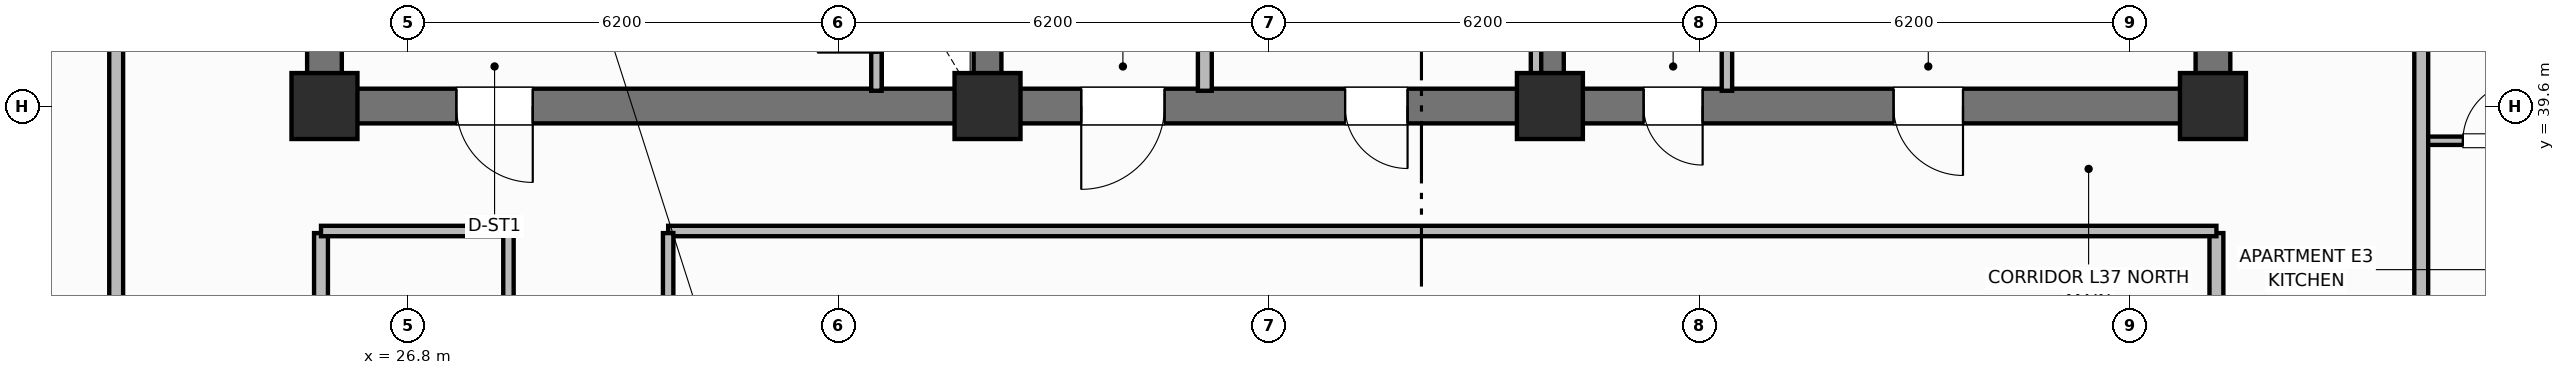
"""IFC4 building model, lengths in metres.
Left out: names, types, materials, properties, quantities, classifications, styles, units other than length and angle.
Written with IfcOpenShell. Run it as: python <this file> out.ifc"""

import sys

from ifc_helpers import new_model, si_unit, direction, frame, frame_2d, origin, origin_2d, place, context, subcontext, project, spatial, rectangle, extrude, element, fill, save


model = new_model("IFC4")
c1 = context("Model", 3, precision=1e-05, world=origin(), true_north=direction((0.0, 1.0)))
c2 = subcontext(c1, "Body", "Model", "MODEL_VIEW")
j1 = project(units=[si_unit("LENGTHUNIT", "METRE"), si_unit("PLANEANGLEUNIT", "RADIAN")], contexts=[c1])
p1 = place(None, origin())
s1 = spatial("IfcSite", under=j1, at=p1, CompositionType="ELEMENT")
p2 = place(p1, origin())
s2 = spatial("IfcBuilding", under=s1, at=p2, CompositionType="ELEMENT")
p3 = place(p2, frame((0.0, 0.0, 151.5)))
s3 = spatial("IfcBuildingStorey", under=s2, at=p3, CompositionType="ELEMENT", Elevation=151.5)
for number, where, z_axis, x_axis in (
    (1, (25.6, 39.85, 0.0), (0.0, 0.0, 1.0), (0.0, 1.0, 0.0)),
    (2, (52.8, 39.85, 0.0), (0.0, 0.0, 1.0), (0.0, 1.0, 0.0)),
):
    element("IfcWall", number, at=place(p3, frame(where, z_axis=z_axis, x_axis=x_axis)), inside=s3, PredefinedType="SHEAR", context=c2, shape_type="SweptSolid", body=[
        extrude(rectangle(XDim=5.7, YDim=0.5, at=frame_2d((2.85, 0.0))), origin(), (0.0, 0.0, 1.0), 3.7),
    ])
p4 = place(p3, frame((52.8, 39.6, 0.0), z_axis=(0.0, 0.0, 1.0), x_axis=(-1.0, 0.0, 0.0)))
e3 = element("IfcWall", 3, at=p4, inside=s3, PredefinedType="SHEAR", context=c2, shape_type="SweptSolid", body=[
    extrude(rectangle(XDim=27.2, YDim=0.5, at=frame_2d((13.6, 0.0))), origin(), (0.0, 0.0, 1.0), 3.7),
])
p5 = place(p4, frame((24.2, 0.0, 0.0)))
e4 = element("IfcOpeningElement", 4, at=p5, cuts=e3, PredefinedType="OPENING", context=c2, shape_type="SweptSolid", body=[
    extrude(rectangle(XDim=1.1, YDim=2.15, at=frame_2d((0.55, 1.075))), frame((0.0, 0.26, 0.0), z_axis=(0.0, -1.0, 0.0), x_axis=(1.0, 0.0, 0.0)), (0.0, 0.0, 1.0), 0.52),
])
p6 = place(p4, frame((15.1, 0.0, 0.0)))
e5 = element("IfcOpeningElement", 5, at=p6, cuts=e3, PredefinedType="OPENING", context=c2, shape_type="SweptSolid", body=[
    extrude(rectangle(XDim=1.2, YDim=2.15, at=frame_2d((0.6, 1.075))), frame((0.0, 0.26, 0.0), z_axis=(0.0, -1.0, 0.0), x_axis=(1.0, 0.0, 0.0)), (0.0, 0.0, 1.0), 0.52),
])
p7 = place(p4, frame((11.6, 0.0, 0.0)))
e6 = element("IfcOpeningElement", 6, at=p7, cuts=e3, PredefinedType="OPENING", context=c2, shape_type="SweptSolid", body=[
    extrude(rectangle(XDim=0.9, YDim=2.1, at=frame_2d((0.45, 1.05))), frame((0.0, 0.26, 0.0), z_axis=(0.0, -1.0, 0.0), x_axis=(1.0, 0.0, 0.0)), (0.0, 0.0, 1.0), 0.52),
])
p8 = place(p4, frame((7.35, 0.0, 0.0)))
e7 = element("IfcOpeningElement", 7, at=p8, cuts=e3, PredefinedType="OPENING", context=c2, shape_type="SweptSolid", body=[
    extrude(rectangle(XDim=0.85, YDim=2.1, at=frame_2d((0.425, 1.05))), frame((0.0, 0.26, 0.0), z_axis=(0.0, -1.0, 0.0), x_axis=(1.0, 0.0, 0.0)), (0.0, 0.0, 1.0), 0.52),
])
p9 = place(p4, frame((3.6, 0.0, 0.0)))
e8 = element("IfcOpeningElement", 8, at=p9, cuts=e3, PredefinedType="OPENING", context=c2, shape_type="SweptSolid", body=[
    extrude(rectangle(XDim=1.0, YDim=2.15, at=frame_2d((0.5, 1.075))), frame((0.0, 0.26, 0.0), z_axis=(0.0, -1.0, 0.0), x_axis=(1.0, 0.0, 0.0)), (0.0, 0.0, 1.0), 0.52),
])
for number, where, z_axis, x_axis in (
    (9, (35.15, 39.85, 0.0), (0.0, 0.0, 1.0), (0.0, 1.0, 0.0)),
    (10, (43.25, 39.85, 0.0), (0.0, 0.0, 1.0), (0.0, 1.0, 0.0)),
):
    element("IfcWall", number, at=place(p3, frame(where, z_axis=z_axis, x_axis=x_axis)), inside=s3, PredefinedType="SHEAR", context=c2, shape_type="SweptSolid", body=[
        extrude(rectangle(XDim=5.7, YDim=0.4, at=frame_2d((2.85, 0.0))), origin(), (0.0, 0.0, 1.0), 3.7),
    ])
for number, where, z_axis, x_axis in (
    (11, (25.6, 39.6, 0.0), (0.0, 0.0, 1.0), (1.0, 0.0, 0.0)),
    (12, (35.15, 39.6, 0.0), (0.0, 0.0, 1.0), (1.0, 0.0, 0.0)),
    (13, (43.25, 39.6, 0.0), (0.0, 0.0, 1.0), (1.0, 0.0, 0.0)),
    (14, (52.8, 39.6, 0.0), (0.0, 0.0, 1.0), (1.0, 0.0, 0.0)),
):
    element("IfcColumn", number, at=place(p3, frame(where, z_axis=z_axis, x_axis=x_axis)), inside=s3, PredefinedType="COLUMN", context=c2, shape_type="SweptSolid", body=[
        extrude(rectangle(XDim=0.95, YDim=0.95, at=origin_2d()), origin(), (0.0, 0.0, 1.0), 3.7),
    ])
p10 = place(p3, frame((33.55, 39.82, 0.0), z_axis=(0.0, 0.0, 1.0), x_axis=(0.0, 1.0, 0.0)))
e15 = element("IfcWall", 15, at=p10, inside=s3, PredefinedType="PARTITIONING", context=c2, shape_type="SweptSolid", body=[
    extrude(rectangle(XDim=2.13, YDim=0.15, at=frame_2d((1.065, 0.0))), origin(), (0.0, 0.0, 1.0), 2.55),
])
p11 = place(p10, frame((0.55, 0.0, 0.0)))
e16 = element("IfcOpeningElement", 16, at=p11, cuts=e15, PredefinedType="OPENING", context=c2, shape_type="SweptSolid", body=[
    extrude(rectangle(XDim=0.85, YDim=2.05, at=frame_2d((0.425, 1.025))), frame((0.0, 0.085, 0.0), z_axis=(0.0, -1.0, 0.0), x_axis=(1.0, 0.0, 0.0)), (0.0, 0.0, 1.0), 0.17),
])
p12 = place(p3, frame((38.28, 39.82, 0.0), z_axis=(0.0, 0.0, 1.0), x_axis=(0.0, 1.0, 0.0)))
e17 = element("IfcWall", 17, at=p12, inside=s3, PredefinedType="PARTITIONING", context=c2, shape_type="SweptSolid", body=[
    extrude(rectangle(XDim=5.63, YDim=0.2, at=frame_2d((2.815, 0.0))), origin(), (0.0, 0.0, 1.0), 2.55),
])
for number, where, z_axis, x_axis in (
    (18, (43.05, 39.82, 0.0), (0.0, 0.0, 1.0), (0.0, 1.0, 0.0)),
    (19, (45.8, 39.82, 0.0), (0.0, 0.0, 1.0), (0.0, 1.0, 0.0)),
):
    element("IfcWall", number, at=place(p3, frame(where, z_axis=z_axis, x_axis=x_axis)), inside=s3, PredefinedType="PARTITIONING", context=c2, shape_type="SweptSolid", body=[
        extrude(rectangle(XDim=5.63, YDim=0.15, at=frame_2d((2.815, 0.0))), origin(), (0.0, 0.0, 1.0), 2.55),
    ])
for number, where, z_axis, x_axis in (
    (20, (25.55, 18.63, 0.0), (0.0, 0.0, 1.0), (0.0, 1.0, 0.0)),
    (21, (52.85, 18.63, 0.0), (0.0, 0.0, 1.0), (0.0, 1.0, 0.0)),
):
    element("IfcWall", number, at=place(p3, frame(where, z_axis=z_axis, x_axis=x_axis)), inside=s3, PredefinedType="PARTITIONING", context=c2, shape_type="SweptSolid", body=[
        extrude(rectangle(XDim=19.14, YDim=0.2, at=frame_2d((9.57, 0.0))), origin(), (0.0, 0.0, 1.0), 2.55),
    ])
p13 = place(p3, frame((25.55, 37.8, 0.0), z_axis=(0.0, 0.0, 1.0), x_axis=(1.0, 0.0, 0.0)))
e22 = element("IfcWall", 22, at=p13, inside=s3, PredefinedType="PARTITIONING", context=c2, shape_type="SweptSolid", body=[
    extrude(rectangle(XDim=2.7, YDim=0.15, at=frame_2d((1.35, 0.0))), origin(), (0.0, 0.0, 1.0), 2.55),
])
p14 = place(p3, frame((30.55, 37.8, 0.0), z_axis=(0.0, 0.0, 1.0), x_axis=(1.0, 0.0, 0.0)))
e23 = element("IfcWall", 23, at=p14, inside=s3, PredefinedType="PARTITIONING", context=c2, shape_type="SweptSolid", body=[
    extrude(rectangle(XDim=22.3, YDim=0.15, at=frame_2d((11.15, 0.0))), origin(), (0.0, 0.0, 1.0), 2.55),
])
p15 = place(p3, frame((28.25, 18.63, 0.0), z_axis=(0.0, 0.0, 1.0), x_axis=(0.0, 1.0, 0.0)))
e24 = element("IfcWall", 24, at=p15, inside=s3, PredefinedType="PARTITIONING", context=c2, shape_type="SweptSolid", body=[
    extrude(rectangle(XDim=19.14, YDim=0.15, at=frame_2d((9.57, 0.0))), origin(), (0.0, 0.0, 1.0), 2.55),
])
p16 = place(p15, frame((3.0, 0.0, 0.0)))
e25 = element("IfcOpeningElement", 25, at=p16, cuts=e24, PredefinedType="OPENING", context=c2, shape_type="SweptSolid", body=[
    extrude(rectangle(XDim=0.9, YDim=2.1, at=frame_2d((0.45, 1.05))), frame((0.0, 0.085, 0.0), z_axis=(0.0, -1.0, 0.0), x_axis=(1.0, 0.0, 0.0)), (0.0, 0.0, 1.0), 0.17),
])
p17 = place(p15, frame((11.5, 0.0, 0.0)))
e26 = element("IfcOpeningElement", 26, at=p17, cuts=e24, PredefinedType="OPENING", context=c2, shape_type="SweptSolid", body=[
    extrude(rectangle(XDim=0.9, YDim=2.1, at=frame_2d((0.45, 1.05))), frame((0.0, 0.085, 0.0), z_axis=(0.0, -1.0, 0.0), x_axis=(1.0, 0.0, 0.0)), (0.0, 0.0, 1.0), 0.17),
])
p18 = place(p3, frame((30.55, 18.63, 0.0), z_axis=(0.0, 0.0, 1.0), x_axis=(0.0, 1.0, 0.0)))
e27 = element("IfcWall", 27, at=p18, inside=s3, PredefinedType="PARTITIONING", context=c2, shape_type="SweptSolid", body=[
    extrude(rectangle(XDim=19.14, YDim=0.15, at=frame_2d((9.57, 0.0))), origin(), (0.0, 0.0, 1.0), 2.55),
])
p19 = place(p18, frame((2.4, 0.0, 0.0)))
e28 = element("IfcOpeningElement", 28, at=p19, cuts=e27, PredefinedType="OPENING", context=c2, shape_type="SweptSolid", body=[
    extrude(rectangle(XDim=1.0, YDim=2.15, at=frame_2d((0.5, 1.075))), frame((0.0, 0.085, 0.0), z_axis=(0.0, -1.0, 0.0), x_axis=(1.0, 0.0, 0.0)), (0.0, 0.0, 1.0), 0.17),
])
p20 = place(p18, frame((8.89, 0.0, 0.0)))
e29 = element("IfcOpeningElement", 29, at=p20, cuts=e27, PredefinedType="OPENING", context=c2, shape_type="SweptSolid", body=[
    extrude(rectangle(XDim=1.0, YDim=2.15, at=frame_2d((0.5, 1.075))), frame((0.0, 0.085, 0.0), z_axis=(0.0, -1.0, 0.0), x_axis=(1.0, 0.0, 0.0)), (0.0, 0.0, 1.0), 0.17),
])
p21 = place(p3, frame((22.6, 10.6, 0.0), z_axis=(0.0, 0.0, 1.0), x_axis=(0.0, 1.0, 0.0)))
e30 = element("IfcWall", 30, at=p21, inside=s3, PredefinedType="PARTITIONING", context=c2, shape_type="SweptSolid", body=[
    extrude(rectangle(XDim=35.2, YDim=0.2, at=frame_2d((17.6, 0.0))), origin(), (0.0, 0.0, 1.0), 2.55),
])
p22 = place(p21, frame((2.65, 0.0, 0.0)))
e31 = element("IfcOpeningElement", 31, at=p22, cuts=e30, PredefinedType="OPENING", context=c2, shape_type="SweptSolid", body=[
    extrude(rectangle(XDim=1.0, YDim=2.15, at=frame_2d((0.5, 1.075))), frame((0.0, 0.11, 0.0), z_axis=(0.0, -1.0, 0.0), x_axis=(1.0, 0.0, 0.0)), (0.0, 0.0, 1.0), 0.22),
])
p23 = place(p21, frame((19.95, 0.0, 0.0)))
e32 = element("IfcOpeningElement", 32, at=p23, cuts=e30, PredefinedType="OPENING", context=c2, shape_type="SweptSolid", body=[
    extrude(rectangle(XDim=1.0, YDim=2.15, at=frame_2d((0.5, 1.075))), frame((0.0, 0.11, 0.0), z_axis=(0.0, -1.0, 0.0), x_axis=(1.0, 0.0, 0.0)), (0.0, 0.0, 1.0), 0.22),
])
p24 = place(p3, frame((55.8, 39.1, 0.0), z_axis=(0.0, 0.0, 1.0), x_axis=(1.0, 0.0, 0.0)))
e33 = element("IfcWall", 33, at=p24, inside=s3, PredefinedType="PARTITIONING", context=c2, shape_type="SweptSolid", body=[
    extrude(rectangle(XDim=2.25, YDim=0.12, at=frame_2d((1.125, 0.0))), origin(), (0.0, 0.0, 1.0), 2.55),
])
p25 = place(p24, frame((0.6, 0.0, 0.0)))
e34 = element("IfcOpeningElement", 34, at=p25, cuts=e33, PredefinedType="OPENING", context=c2, shape_type="SweptSolid", body=[
    extrude(rectangle(XDim=0.85, YDim=2.1, at=frame_2d((0.425, 1.05))), frame((0.0, 0.07, 0.0), z_axis=(0.0, -1.0, 0.0), x_axis=(1.0, 0.0, 0.0)), (0.0, 0.0, 1.0), 0.14),
])
p26 = place(p3, frame((55.8, 10.6, 0.0), z_axis=(0.0, 0.0, 1.0), x_axis=(0.0, 1.0, 0.0)))
e35 = element("IfcWall", 35, at=p26, inside=s3, PredefinedType="PARTITIONING", context=c2, shape_type="SweptSolid", body=[
    extrude(rectangle(XDim=35.2, YDim=0.2, at=frame_2d((17.6, 0.0))), origin(), (0.0, 0.0, 1.0), 2.55),
])
p27 = place(p26, frame((2.65, 0.0, 0.0)))
e36 = element("IfcOpeningElement", 36, at=p27, cuts=e35, PredefinedType="OPENING", context=c2, shape_type="SweptSolid", body=[
    extrude(rectangle(XDim=1.0, YDim=2.15, at=frame_2d((0.5, 1.075))), frame((0.0, 0.11, 0.0), z_axis=(0.0, -1.0, 0.0), x_axis=(1.0, 0.0, 0.0)), (0.0, 0.0, 1.0), 0.22),
])
p28 = place(p26, frame((12.518, 0.0, 0.0)))
e37 = element("IfcOpeningElement", 37, at=p28, cuts=e35, PredefinedType="OPENING", context=c2, shape_type="SweptSolid", body=[
    extrude(rectangle(XDim=1.0, YDim=2.15, at=frame_2d((0.5, 1.075))), frame((0.0, 0.11, 0.0), z_axis=(0.0, -1.0, 0.0), x_axis=(1.0, 0.0, 0.0)), (0.0, 0.0, 1.0), 0.22),
])
p29 = place(p26, frame((23.65, 0.0, 0.0)))
e38 = element("IfcOpeningElement", 38, at=p29, cuts=e35, PredefinedType="OPENING", context=c2, shape_type="SweptSolid", body=[
    extrude(rectangle(XDim=1.0, YDim=2.15, at=frame_2d((0.5, 1.075))), frame((0.0, 0.11, 0.0), z_axis=(0.0, -1.0, 0.0), x_axis=(1.0, 0.0, 0.0)), (0.0, 0.0, 1.0), 0.22),
])
p30 = place(p11, origin())
e39 = element("IfcDoor", 39, at=p30, inside=s3, OperationType="SINGLE_SWING_LEFT", PredefinedType="TRAPDOOR", context=c2, shape_type="SweptSolid", body=[
    extrude(rectangle(XDim=0.85, YDim=2.05, at=frame_2d((0.425, 1.025))), frame((0.0, 0.025, 0.0), z_axis=(0.0, -1.0, 0.0), x_axis=(1.0, 0.0, 0.0)), (0.0, 0.0, 1.0), 0.05),
])
fill(e16, e39)
p31 = place(p25, origin())
e40 = element("IfcDoor", 40, at=p31, inside=s3, OperationType="SINGLE_SWING_RIGHT", PredefinedType="DOOR", context=c2, shape_type="SweptSolid", body=[
    extrude(rectangle(XDim=0.85, YDim=2.1, at=frame_2d((0.425, 1.05))), frame((0.0, 0.025, 0.0), z_axis=(0.0, -1.0, 0.0), x_axis=(1.0, 0.0, 0.0)), (0.0, 0.0, 1.0), 0.05),
])
fill(e34, e40)
p32 = place(p5, origin())
e41 = element("IfcDoor", 41, at=p32, inside=s3, OperationType="SINGLE_SWING_LEFT", PredefinedType="DOOR", context=c2, shape_type="SweptSolid", body=[
    extrude(rectangle(XDim=1.1, YDim=2.15, at=frame_2d((0.55, 1.075))), frame((0.0, 0.025, 0.0), z_axis=(0.0, -1.0, 0.0), x_axis=(1.0, 0.0, 0.0)), (0.0, 0.0, 1.0), 0.05),
])
fill(e4, e41)
p33 = place(p6, origin())
e42 = element("IfcDoor", 42, at=p33, inside=s3, OperationType="SINGLE_SWING_RIGHT", PredefinedType="DOOR", context=c2, shape_type="SweptSolid", body=[
    extrude(rectangle(XDim=1.2, YDim=2.15, at=frame_2d((0.6, 1.075))), frame((0.0, 0.025, 0.0), z_axis=(0.0, -1.0, 0.0), x_axis=(1.0, 0.0, 0.0)), (0.0, 0.0, 1.0), 0.05),
])
fill(e5, e42)
p34 = place(p7, origin())
e43 = element("IfcDoor", 43, at=p34, inside=s3, OperationType="SINGLE_SWING_LEFT", PredefinedType="DOOR", context=c2, shape_type="SweptSolid", body=[
    extrude(rectangle(XDim=0.9, YDim=2.1, at=frame_2d((0.45, 1.05))), frame((0.0, 0.025, 0.0), z_axis=(0.0, -1.0, 0.0), x_axis=(1.0, 0.0, 0.0)), (0.0, 0.0, 1.0), 0.05),
])
fill(e6, e43)
p35 = place(p8, origin())
e44 = element("IfcDoor", 44, at=p35, inside=s3, OperationType="SINGLE_SWING_LEFT", PredefinedType="DOOR", context=c2, shape_type="SweptSolid", body=[
    extrude(rectangle(XDim=0.85, YDim=2.1, at=frame_2d((0.425, 1.05))), frame((0.0, 0.025, 0.0), z_axis=(0.0, -1.0, 0.0), x_axis=(1.0, 0.0, 0.0)), (0.0, 0.0, 1.0), 0.05),
])
fill(e7, e44)
p36 = place(p9, origin())
e45 = element("IfcDoor", 45, at=p36, inside=s3, OperationType="SINGLE_SWING_LEFT", PredefinedType="DOOR", context=c2, shape_type="SweptSolid", body=[
    extrude(rectangle(XDim=1.0, YDim=2.15, at=frame_2d((0.5, 1.075))), frame((0.0, 0.025, 0.0), z_axis=(0.0, -1.0, 0.0), x_axis=(1.0, 0.0, 0.0)), (0.0, 0.0, 1.0), 0.05),
])
fill(e8, e45)
save(model, sys.argv[1])
